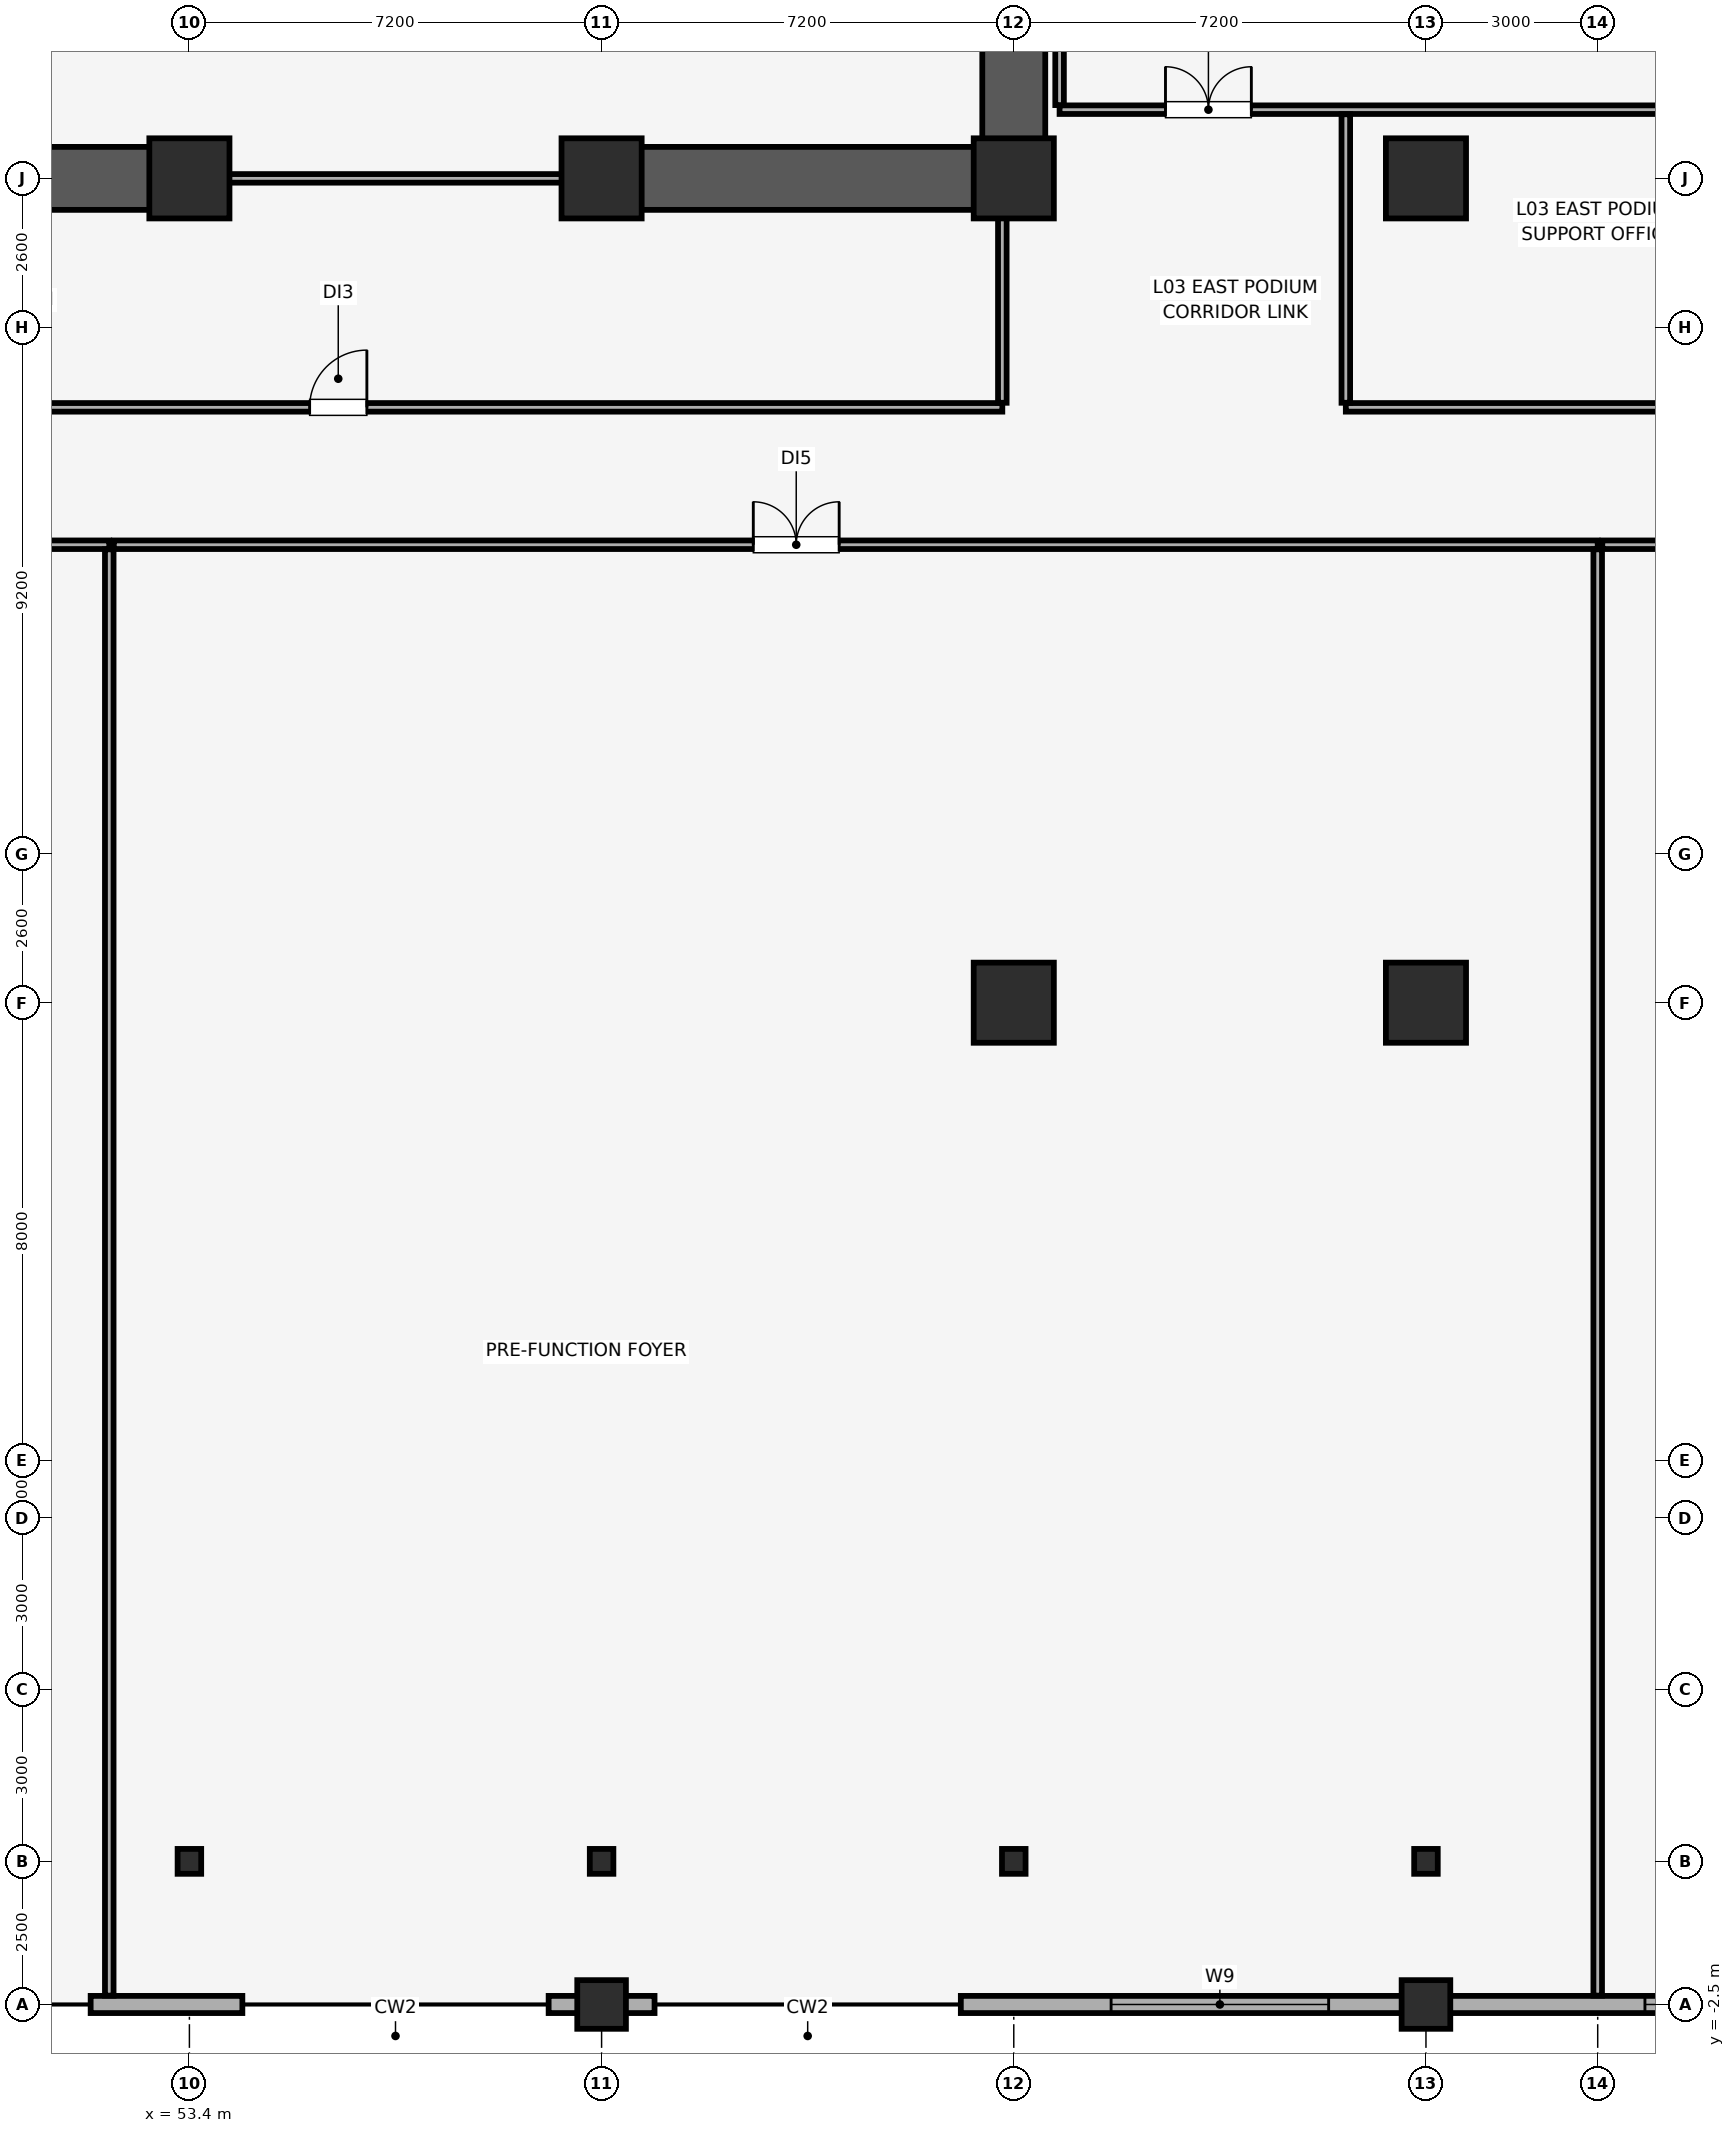
"""IFC4 building model, lengths in metres.
Left out: names, types, materials, properties, quantities, classifications, styles, units other than length and angle.
Written with IfcOpenShell. Run it as: python <this file> out.ifc"""

import sys

from ifc_helpers import new_model, si_unit, direction, frame, frame_2d, origin, origin_2d, place, context, subcontext, project, spatial, rectangle, i_section, extrude, element, fill, save


model = new_model("IFC4")
c1 = context("Model", 3, precision=1e-05, world=origin(), true_north=direction((0.0, 1.0)))
c2 = subcontext(c1, "Body", "Model", "MODEL_VIEW")
j1 = project(units=[si_unit("LENGTHUNIT", "METRE"), si_unit("PLANEANGLEUNIT", "RADIAN")], contexts=[c1])
p1 = place(None, origin())
s1 = spatial("IfcSite", under=j1, at=p1, CompositionType="ELEMENT")
p2 = place(p1, origin())
s2 = spatial("IfcBuilding", under=s1, at=p2, CompositionType="ELEMENT")
p3 = place(p2, frame((0.0, 0.0, 19.4)))
s3 = spatial("IfcBuildingStorey", under=s2, at=p3, CompositionType="ELEMENT", Elevation=19.4)
for number, where, z_axis, x_axis in (
    (1, (60.6, -2.5, 0.0), (0.0, 0.0, 1.0), (1.0, 0.0, 0.0)),
    (2, (75.0, -2.5, 0.0), (0.0, 0.0, 1.0), (1.0, 0.0, 0.0)),
):
    element("IfcColumn", number, at=place(p3, frame(where, z_axis=z_axis, x_axis=x_axis)), inside=s3, PredefinedType="COLUMN", context=c2, shape_type="SweptSolid", body=[
        extrude(rectangle(XDim=0.85, YDim=0.85, at=origin_2d()), origin(), (0.0, 0.0, 1.0), 6.28),
    ])
p4 = place(p3, frame((53.4, 0.0, 0.0), z_axis=(0.0, 0.0, 1.0), x_axis=(1.0, 0.0, 0.0)))
e3 = element("IfcColumn", 3, at=p4, inside=s3, PredefinedType="COLUMN", context=c2, shape_type="SweptSolid", body=[
    extrude(i_section(OverallWidth=0.412, OverallDepth=0.435, WebThickness=0.036, FlangeThickness=0.056, FilletRadius=0.015, at=origin_2d()), origin(), (0.0, 0.0, 1.0), 6.28),
])
p5 = place(p3, frame((53.4, 29.4, 0.0), z_axis=(0.0, 0.0, 1.0), x_axis=(1.0, 0.0, 0.0)))
e4 = element("IfcColumn", 4, at=p5, inside=s3, PredefinedType="COLUMN", context=c2, shape_type="SweptSolid", body=[
    extrude(rectangle(XDim=1.4, YDim=1.4, at=origin_2d()), origin(), (0.0, 0.0, 1.0), 6.28),
])
p6 = place(p3, frame((60.6, 0.0, 0.0), z_axis=(0.0, 0.0, 1.0), x_axis=(1.0, 0.0, 0.0)))
e5 = element("IfcColumn", 5, at=p6, inside=s3, PredefinedType="COLUMN", context=c2, shape_type="SweptSolid", body=[
    extrude(i_section(OverallWidth=0.412, OverallDepth=0.435, WebThickness=0.036, FlangeThickness=0.056, FilletRadius=0.015, at=origin_2d()), origin(), (0.0, 0.0, 1.0), 6.28),
])
p7 = place(p3, frame((60.6, 29.4, 0.0), z_axis=(0.0, 0.0, 1.0), x_axis=(1.0, 0.0, 0.0)))
e6 = element("IfcColumn", 6, at=p7, inside=s3, PredefinedType="COLUMN", context=c2, shape_type="SweptSolid", body=[
    extrude(rectangle(XDim=1.4, YDim=1.4, at=origin_2d()), origin(), (0.0, 0.0, 1.0), 6.28),
])
p8 = place(p3, frame((67.8, 0.0, 0.0), z_axis=(0.0, 0.0, 1.0), x_axis=(1.0, 0.0, 0.0)))
e7 = element("IfcColumn", 7, at=p8, inside=s3, PredefinedType="COLUMN", context=c2, shape_type="SweptSolid", body=[
    extrude(i_section(OverallWidth=0.412, OverallDepth=0.435, WebThickness=0.036, FlangeThickness=0.056, FilletRadius=0.015, at=origin_2d()), origin(), (0.0, 0.0, 1.0), 6.28),
])
p9 = place(p3, frame((67.8, 29.4, 0.0), z_axis=(0.0, 0.0, 1.0), x_axis=(1.0, 0.0, 0.0)))
e8 = element("IfcColumn", 8, at=p9, inside=s3, PredefinedType="COLUMN", context=c2, shape_type="SweptSolid", body=[
    extrude(rectangle(XDim=1.4, YDim=1.4, at=origin_2d()), origin(), (0.0, 0.0, 1.0), 6.28),
])
p10 = place(p3, frame((75.0, 0.0, 0.0), z_axis=(0.0, 0.0, 1.0), x_axis=(1.0, 0.0, 0.0)))
e9 = element("IfcColumn", 9, at=p10, inside=s3, PredefinedType="COLUMN", context=c2, shape_type="SweptSolid", body=[
    extrude(i_section(OverallWidth=0.412, OverallDepth=0.435, WebThickness=0.036, FlangeThickness=0.056, FilletRadius=0.015, at=origin_2d()), origin(), (0.0, 0.0, 1.0), 6.28),
])
for number, where, z_axis, x_axis in (
    (10, (75.0, 29.4, 0.0), (0.0, 0.0, 1.0), (1.0, 0.0, 0.0)),
    (11, (75.0, 15.0, 0.0), (0.0, 0.0, 1.0), (1.0, 0.0, 0.0)),
    (12, (67.8, 15.0, 0.0), (0.0, 0.0, 1.0), (1.0, 0.0, 0.0)),
):
    element("IfcColumn", number, at=place(p3, frame(where, z_axis=z_axis, x_axis=x_axis)), inside=s3, PredefinedType="COLUMN", context=c2, shape_type="SweptSolid", body=[
        extrude(rectangle(XDim=1.4, YDim=1.4, at=origin_2d()), origin(), (0.0, 0.0, 1.0), 6.28),
    ])
p11 = place(p3, frame((51.675, -2.5, 0.0), z_axis=(0.0, 0.0, 1.0), x_axis=(1.0, 0.0, 0.0)))
e13 = element("IfcWall", 13, at=p11, inside=s3, PredefinedType="SOLIDWALL", context=c2, shape_type="SweptSolid", body=[
    extrude(rectangle(XDim=2.65, YDim=0.3, at=frame_2d((1.325, 0.0))), origin(), (0.0, 0.0, 1.0), 5.33),
])
p12 = place(p3, frame((59.675, -2.5, 0.0), z_axis=(0.0, 0.0, 1.0), x_axis=(1.0, 0.0, 0.0)))
e14 = element("IfcWall", 14, at=p12, inside=s3, PredefinedType="SOLIDWALL", context=c2, shape_type="SweptSolid", body=[
    extrude(rectangle(XDim=1.85, YDim=0.3, at=frame_2d((0.925, 0.0))), origin(), (0.0, 0.0, 1.0), 5.33),
])
p13 = place(p3, frame((66.875, -2.5, 0.0), z_axis=(0.0, 0.0, 1.0), x_axis=(1.0, 0.0, 0.0)))
e15 = element("IfcWall", 15, at=p13, inside=s3, PredefinedType="SOLIDWALL", context=c2, shape_type="SweptSolid", body=[
    extrude(rectangle(XDim=16.725, YDim=0.3, at=frame_2d((8.363, 0.0))), origin(), (0.0, 0.0, 1.0), 5.33),
])
p14 = place(p13, frame((2.625, 0.0, 0.85)))
e16 = element("IfcOpeningElement", 16, at=p14, cuts=e15, PredefinedType="OPENING", context=c2, shape_type="SweptSolid", body=[
    extrude(rectangle(XDim=3.8, YDim=2.2, at=frame_2d((1.9, 1.1))), frame((0.0, 0.16, 0.0), z_axis=(0.0, -1.0, 0.0), x_axis=(1.0, 0.0, 0.0)), (0.0, 0.0, 1.0), 0.32),
])
p15 = place(p13, frame((11.95, 0.0, 0.85)))
e17 = element("IfcOpeningElement", 17, at=p15, cuts=e15, PredefinedType="OPENING", context=c2, shape_type="SweptSolid", body=[
    extrude(rectangle(XDim=3.8, YDim=2.2, at=frame_2d((1.9, 1.1))), frame((0.0, 0.16, 0.0), z_axis=(0.0, -1.0, 0.0), x_axis=(1.0, 0.0, 0.0)), (0.0, 0.0, 1.0), 0.32),
])
p16 = place(p3, frame((67.8, 29.4, 0.0), z_axis=(0.0, 0.0, 1.0), x_axis=(0.0, 1.0, 0.0)))
e18 = element("IfcWall", 18, at=p16, inside=s3, PredefinedType="SHEAR", context=c2, shape_type="SweptSolid", body=[
    extrude(rectangle(XDim=19.2, YDim=1.1, at=frame_2d((9.6, 0.0))), origin(), (0.0, 0.0, 1.0), 6.28),
])
p17 = place(p3, frame((46.0, 29.4, 0.0), z_axis=(0.0, 0.0, 1.0), x_axis=(1.0, 0.0, 0.0)))
e19 = element("IfcWall", 19, at=p17, inside=s3, PredefinedType="SHEAR", context=c2, shape_type="SweptSolid", body=[
    extrude(rectangle(XDim=7.6, YDim=1.1, at=frame_2d((3.8, 0.0))), origin(), (0.0, 0.0, 1.0), 6.28),
])
p18 = place(p3, frame((60.4, 29.4, 0.0), z_axis=(0.0, 0.0, 1.0), x_axis=(1.0, 0.0, 0.0)))
e20 = element("IfcWall", 20, at=p18, inside=s3, PredefinedType="SHEAR", context=c2, shape_type="SweptSolid", body=[
    extrude(rectangle(XDim=6.845, YDim=1.1, at=frame_2d((3.423, 0.0))), origin(), (0.0, 0.0, 1.0), 6.28),
])
p19 = place(p3, frame((68.6, 30.6, 0.0), z_axis=(0.0, 0.0, 1.0), x_axis=(1.0, 0.0, 0.0)))
e21 = element("IfcWall", 21, at=p19, inside=s3, PredefinedType="PARTITIONING", context=c2, shape_type="SweptSolid", body=[
    extrude(rectangle(XDim=18.445, YDim=0.15, at=frame_2d((9.222, 0.0))), origin(), (0.0, 0.0, 1.0), 6.28),
])
p20 = place(p19, frame((1.85, 0.0, 0.0)))
e22 = element("IfcOpeningElement", 22, at=p20, cuts=e21, PredefinedType="OPENING", context=c2, shape_type="SweptSolid", body=[
    extrude(rectangle(XDim=1.5, YDim=2.25, at=frame_2d((0.75, 1.125))), frame((0.0, 0.085, 0.0), z_axis=(0.0, -1.0, 0.0), x_axis=(1.0, 0.0, 0.0)), (0.0, 0.0, 1.0), 0.17),
])
p21 = place(p3, frame((68.6, 30.68, 0.0), z_axis=(0.0, 0.0, 1.0), x_axis=(0.0, 1.0, 0.0)))
e23 = element("IfcWall", 23, at=p21, inside=s3, PredefinedType="PARTITIONING", context=c2, shape_type="SweptSolid", body=[
    extrude(rectangle(XDim=21.665, YDim=0.15, at=frame_2d((10.833, 0.0))), origin(), (0.0, 0.0, 1.0), 6.28),
])
p22 = place(p3, frame((73.6, 25.4, 0.0), z_axis=(0.0, 0.0, 1.0), x_axis=(1.0, 0.0, 0.0)))
e24 = element("IfcWall", 24, at=p22, inside=s3, PredefinedType="PARTITIONING", context=c2, shape_type="SweptSolid", body=[
    extrude(rectangle(XDim=13.445, YDim=0.15, at=frame_2d((6.722, 0.0))), origin(), (0.0, 0.0, 1.0), 6.28),
])
p23 = place(p22, frame((5.9, 0.0, 0.0)))
e25 = element("IfcOpeningElement", 25, at=p23, cuts=e24, PredefinedType="OPENING", context=c2, shape_type="SweptSolid", body=[
    extrude(rectangle(XDim=1.0, YDim=2.15, at=frame_2d((0.5, 1.075))), frame((0.0, 0.085, 0.0), z_axis=(0.0, -1.0, 0.0), x_axis=(1.0, 0.0, 0.0)), (0.0, 0.0, 1.0), 0.17),
])
p24 = place(p3, frame((73.6, 25.48, 0.0), z_axis=(0.0, 0.0, 1.0), x_axis=(0.0, 1.0, 0.0)))
e26 = element("IfcWall", 26, at=p24, inside=s3, PredefinedType="PARTITIONING", context=c2, shape_type="SweptSolid", body=[
    extrude(rectangle(XDim=5.04, YDim=0.15, at=frame_2d((2.52, 0.0))), origin(), (0.0, 0.0, 1.0), 6.28),
])
p25 = place(p3, frame((6.0, 23.0, 0.0), z_axis=(0.0, 0.0, 1.0), x_axis=(1.0, 0.0, 0.0)))
e27 = element("IfcWall", 27, at=p25, inside=s3, PredefinedType="PARTITIONING", context=c2, shape_type="SweptSolid", body=[
    extrude(rectangle(XDim=46.0, YDim=0.15, at=frame_2d((23.0, 0.0))), origin(), (0.0, 0.0, 1.0), 6.28),
])
p26 = place(p25, frame((21.25, 0.0, 0.0)))
e28 = element("IfcOpeningElement", 28, at=p26, cuts=e27, PredefinedType="OPENING", context=c2, shape_type="SweptSolid", body=[
    extrude(rectangle(XDim=1.5, YDim=2.25, at=frame_2d((0.75, 1.125))), frame((0.0, 0.085, 0.0), z_axis=(0.0, -1.0, 0.0), x_axis=(1.0, 0.0, 0.0)), (0.0, 0.0, 1.0), 0.17),
])
p27 = place(p3, frame((52.0, -2.345, 0.0), z_axis=(0.0, 0.0, 1.0), x_axis=(0.0, 1.0, 0.0)))
e29 = element("IfcWall", 29, at=p27, inside=s3, PredefinedType="PARTITIONING", context=c2, shape_type="SweptSolid", body=[
    extrude(rectangle(XDim=25.265, YDim=0.15, at=frame_2d((12.632, 0.0))), origin(), (0.0, 0.0, 1.0), 6.28),
])
p28 = place(p3, frame((52.08, 23.0, 0.0), z_axis=(0.0, 0.0, 1.0), x_axis=(1.0, 0.0, 0.0)))
e30 = element("IfcWall", 30, at=p28, inside=s3, PredefinedType="PARTITIONING", context=c2, shape_type="SweptSolid", body=[
    extrude(rectangle(XDim=25.92, YDim=0.15, at=frame_2d((12.96, 0.0))), origin(), (0.0, 0.0, 1.0), 6.28),
])
p29 = place(p28, frame((11.17, 0.0, 0.0)))
e31 = element("IfcOpeningElement", 31, at=p29, cuts=e30, PredefinedType="OPENING", context=c2, shape_type="SweptSolid", body=[
    extrude(rectangle(XDim=1.5, YDim=2.25, at=frame_2d((0.75, 1.125))), frame((0.0, 0.085, 0.0), z_axis=(0.0, -1.0, 0.0), x_axis=(1.0, 0.0, 0.0)), (0.0, 0.0, 1.0), 0.17),
])
p30 = place(p3, frame((78.0, -2.345, 0.0), z_axis=(0.0, 0.0, 1.0), x_axis=(0.0, 1.0, 0.0)))
e32 = element("IfcWall", 32, at=p30, inside=s3, PredefinedType="PARTITIONING", context=c2, shape_type="SweptSolid", body=[
    extrude(rectangle(XDim=25.265, YDim=0.15, at=frame_2d((12.632, 0.0))), origin(), (0.0, 0.0, 1.0), 6.28),
])
p31 = place(p3, frame((78.08, 23.0, 0.0), z_axis=(0.0, 0.0, 1.0), x_axis=(1.0, 0.0, 0.0)))
e33 = element("IfcWall", 33, at=p31, inside=s3, PredefinedType="PARTITIONING", context=c2, shape_type="SweptSolid", body=[
    extrude(rectangle(XDim=8.965, YDim=0.15, at=frame_2d((4.482, 0.0))), origin(), (0.0, 0.0, 1.0), 6.28),
])
p32 = place(p31, frame((3.17, 0.0, 0.0)))
e34 = element("IfcOpeningElement", 34, at=p32, cuts=e33, PredefinedType="OPENING", context=c2, shape_type="SweptSolid", body=[
    extrude(rectangle(XDim=1.5, YDim=2.25, at=frame_2d((0.75, 1.125))), frame((0.0, 0.085, 0.0), z_axis=(0.0, -1.0, 0.0), x_axis=(1.0, 0.0, 0.0)), (0.0, 0.0, 1.0), 0.17),
])
p33 = place(p3, frame((44.0, 25.4, 0.0), z_axis=(0.0, 0.0, 1.0), x_axis=(1.0, 0.0, 0.0)))
e35 = element("IfcWall", 35, at=p33, inside=s3, PredefinedType="PARTITIONING", context=c2, shape_type="SweptSolid", body=[
    extrude(rectangle(XDim=23.6, YDim=0.15, at=frame_2d((11.8, 0.0))), origin(), (0.0, 0.0, 1.0), 6.28),
])
p34 = place(p33, frame((11.5, 0.0, 0.0)))
e36 = element("IfcOpeningElement", 36, at=p34, cuts=e35, PredefinedType="OPENING", context=c2, shape_type="SweptSolid", body=[
    extrude(rectangle(XDim=1.0, YDim=2.15, at=frame_2d((0.5, 1.075))), frame((0.0, 0.085, 0.0), z_axis=(0.0, -1.0, 0.0), x_axis=(1.0, 0.0, 0.0)), (0.0, 0.0, 1.0), 0.17),
])
p35 = place(p3, frame((53.61, 29.4, 0.0), z_axis=(0.0, 0.0, 1.0), x_axis=(1.0, 0.0, 0.0)))
e37 = element("IfcWall", 37, at=p35, inside=s3, PredefinedType="PARTITIONING", context=c2, shape_type="SweptSolid", body=[
    extrude(rectangle(XDim=6.78, YDim=0.15, at=frame_2d((3.39, 0.0))), origin(), (0.0, 0.0, 1.0), 5.18),
])
p36 = place(p3, frame((67.6, 25.48, 0.0), z_axis=(0.0, 0.0, 1.0), x_axis=(0.0, 1.0, 0.0)))
e38 = element("IfcWall", 38, at=p36, inside=s3, PredefinedType="PARTITIONING", context=c2, shape_type="SweptSolid", body=[
    extrude(rectangle(XDim=3.91, YDim=0.15, at=frame_2d((1.955, 0.0))), origin(), (0.0, 0.0, 1.0), 5.68),
])
p37 = place(p14, origin())
e39 = element("IfcWindow", 39, at=p37, inside=s3, PartitioningType="SINGLE_PANEL", PredefinedType="WINDOW", context=c2, shape_type="SweptSolid", body=[
    extrude(rectangle(XDim=3.8, YDim=2.2, at=frame_2d((1.9, 1.1))), frame((0.0, 0.03, 0.0), z_axis=(0.0, -1.0, 0.0), x_axis=(1.0, 0.0, 0.0)), (0.0, 0.0, 1.0), 0.06),
])
fill(e16, e39)
p38 = place(p15, origin())
e40 = element("IfcWindow", 40, at=p38, inside=s3, PartitioningType="SINGLE_PANEL", PredefinedType="WINDOW", context=c2, shape_type="SweptSolid", body=[
    extrude(rectangle(XDim=3.8, YDim=2.2, at=frame_2d((1.9, 1.1))), frame((0.0, 0.03, 0.0), z_axis=(0.0, -1.0, 0.0), x_axis=(1.0, 0.0, 0.0)), (0.0, 0.0, 1.0), 0.06),
])
fill(e17, e40)
p39 = place(p20, origin())
e41 = element("IfcDoor", 41, at=p39, inside=s3, OperationType="DOUBLE_DOOR_SINGLE_SWING", PredefinedType="DOOR", context=c2, shape_type="SweptSolid", body=[
    extrude(rectangle(XDim=1.5, YDim=2.25, at=frame_2d((0.75, 1.125))), frame((0.0, 0.025, 0.0), z_axis=(0.0, -1.0, 0.0), x_axis=(1.0, 0.0, 0.0)), (0.0, 0.0, 1.0), 0.05),
])
fill(e22, e41)
p40 = place(p29, origin())
e42 = element("IfcDoor", 42, at=p40, inside=s3, OperationType="DOUBLE_DOOR_SINGLE_SWING", PredefinedType="DOOR", context=c2, shape_type="SweptSolid", body=[
    extrude(rectangle(XDim=1.5, YDim=2.25, at=frame_2d((0.75, 1.125))), frame((0.0, 0.025, 0.0), z_axis=(0.0, -1.0, 0.0), x_axis=(1.0, 0.0, 0.0)), (0.0, 0.0, 1.0), 0.05),
])
fill(e31, e42)
p41 = place(p34, origin())
e43 = element("IfcDoor", 43, at=p41, inside=s3, OperationType="SINGLE_SWING_RIGHT", PredefinedType="DOOR", context=c2, shape_type="SweptSolid", body=[
    extrude(rectangle(XDim=1.0, YDim=2.15, at=frame_2d((0.5, 1.075))), frame((0.0, 0.025, 0.0), z_axis=(0.0, -1.0, 0.0), x_axis=(1.0, 0.0, 0.0)), (0.0, 0.0, 1.0), 0.05),
])
fill(e36, e43)
save(model, sys.argv[1])
